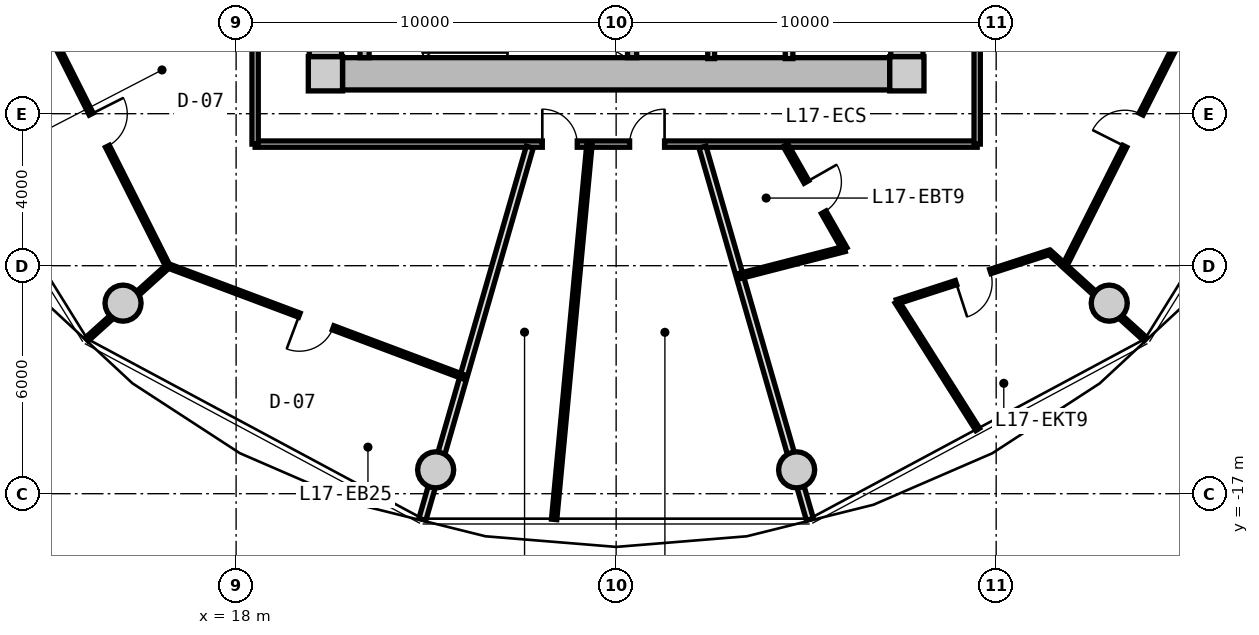
"""IFC4 building model, lengths in metres.
Left out: names, types, materials, properties, quantities, classifications, styles, units other than length and angle.
Written with IfcOpenShell. Run it as: python <this file> out.ifc"""

import sys

from ifc_helpers import new_model, si_unit, direction, frame, frame_2d, origin, origin_2d, place, context, subcontext, project, spatial, rectangle, circle, extrude, source, transform, mapped, element, fill, save


model = new_model("IFC4")
c1 = context("Model", 3, precision=1e-05, world=origin(), true_north=direction((0.0, 1.0)))
c2 = subcontext(c1, "Body", "Model", "MODEL_VIEW")
j1 = project(units=[si_unit("LENGTHUNIT", "METRE"), si_unit("PLANEANGLEUNIT", "RADIAN")], contexts=[c1])
p1 = place(None, origin())
s1 = spatial("IfcSite", under=j1, at=p1, CompositionType="ELEMENT")
p2 = place(p1, origin())
s2 = spatial("IfcBuilding", under=s1, at=p2, CompositionType="ELEMENT")
p3 = place(p2, frame((0.0, 0.0, 58.2)))
s3 = spatial("IfcBuildingStorey", under=s2, at=p3, CompositionType="ELEMENT", Elevation=58.2)
m1 = source(origin(), c2, "Body", "SweptSolid", [
    extrude(rectangle(XDim=0.9, YDim=0.9, at=origin_2d()), origin(), (0.0, 0.0, 1.0), 3.05),
])
for number, where, z_axis, x_axis in (
    (1, (20.35, -5.95, 0.0), (0.0, 0.0, 1.0), (1.0, 0.0, 0.0)),
    (2, (35.65, -5.95, 0.0), (0.0, 0.0, 1.0), (1.0, 0.0, 0.0)),
):
    element("IfcColumn", number, at=place(p3, frame(where, z_axis=z_axis, x_axis=x_axis)), inside=s3, PredefinedType="COLUMN", context=c2, shape_type="MappedRepresentation", body=[
        mapped(m1, transform((0.0, 0.0, 0.0), x_axis=(1.0, 0.0, 0.0), y_axis=(0.0, 1.0, 0.0), z_axis=(0.0, 0.0, 1.0), scale=1.0)),
    ])
m2 = source(origin(), c2, "Body", "SweptSolid", [
    extrude(rectangle(XDim=14.4, YDim=0.85, at=frame_2d((7.2, 0.0))), origin(), (0.0, 0.0, 1.0), 2.79),
])
p4 = place(p3, frame((35.2, -5.95, 0.0), z_axis=(0.0, 0.0, 1.0), x_axis=(-1.0, 0.0, 0.0)))
e3 = element("IfcWall", 3, at=p4, inside=s3, PredefinedType="SHEAR", context=c2, shape_type="MappedRepresentation", body=[
    mapped(m2, transform((0.0, 0.0, 0.0), x_axis=(1.0, 0.0, 0.0), y_axis=(0.0, 1.0, 0.0), z_axis=(0.0, 0.0, 1.0), scale=1.0)),
])
m3 = source(origin(), c2, "Body", "SweptSolid", [
    extrude(rectangle(XDim=11.0, YDim=0.85, at=frame_2d((5.5, 0.0))), origin(), (0.0, 0.0, 1.0), 2.79),
])
p5 = place(p3, frame((20.35, -5.5, 0.0), z_axis=(0.0, 0.0, 1.0), x_axis=(0.0, 1.0, 0.0)))
e4 = element("IfcWall", 4, at=p5, inside=s3, PredefinedType="SHEAR", context=c2, shape_type="MappedRepresentation", body=[
    mapped(m3, transform((0.0, 0.0, 0.0), x_axis=(1.0, 0.0, 0.0), y_axis=(0.0, 1.0, 0.0), z_axis=(0.0, 0.0, 1.0), scale=1.0)),
])
p6 = place(p5, frame((3.8, 0.0, 0.0)))
e5 = element("IfcOpeningElement", 5, at=p6, cuts=e4, PredefinedType="OPENING", context=c2, shape_type="SweptSolid", body=[
    extrude(rectangle(XDim=1.2, YDim=2.15, at=frame_2d((0.6, 1.075))), frame((0.0, 0.435, 0.0), z_axis=(0.0, -1.0, 0.0), x_axis=(1.0, 0.0, 0.0)), (0.0, 0.0, 1.0), 0.87),
])
p7 = place(p3, frame((35.65, 5.5, 0.0), z_axis=(0.0, 0.0, 1.0), x_axis=(0.0, -1.0, 0.0)))
e6 = element("IfcWall", 6, at=p7, inside=s3, PredefinedType="SHEAR", context=c2, shape_type="MappedRepresentation", body=[
    mapped(m3, transform((0.0, 0.0, 0.0), x_axis=(1.0, 0.0, 0.0), y_axis=(0.0, 1.0, 0.0), z_axis=(0.0, 0.0, 1.0), scale=1.0)),
])
p8 = place(p7, frame((5.65, 0.0, 0.0)))
e7 = element("IfcOpeningElement", 7, at=p8, cuts=e6, PredefinedType="OPENING", context=c2, shape_type="SweptSolid", body=[
    extrude(rectangle(XDim=1.2, YDim=2.15, at=frame_2d((0.6, 1.075))), frame((0.0, 0.435, 0.0), z_axis=(0.0, -1.0, 0.0), x_axis=(1.0, 0.0, 0.0)), (0.0, 0.0, 1.0), 0.87),
])
p9 = place(p7, frame((9.3, 0.0, 0.0)))
e8 = element("IfcOpeningElement", 8, at=p9, cuts=e6, PredefinedType="OPENING", context=c2, shape_type="SweptSolid", body=[
    extrude(rectangle(XDim=1.0, YDim=2.1, at=frame_2d((0.5, 1.05))), frame((0.0, 0.435, 0.0), z_axis=(0.0, -1.0, 0.0), x_axis=(1.0, 0.0, 0.0)), (0.0, 0.0, 1.0), 0.87),
])
m4 = source(origin(), c2, "Body", "SweptSolid", [
    extrude(circle(Radius=0.475, at=origin_2d()), origin(), (0.0, 0.0, 1.0), 3.05),
])
for number, where, z_axis, x_axis in (
    (9, (15.025, -11.985, 0.0), (0.0, 0.0, 1.0), (1.0, 0.0, 0.0)),
    (10, (23.251, -16.373, 0.0), (0.0, 0.0, 1.0), (1.0, 0.0, 0.0)),
    (11, (32.749, -16.373, 0.0), (0.0, 0.0, 1.0), (1.0, 0.0, 0.0)),
    (12, (40.975, -11.985, 0.0), (0.0, 0.0, 1.0), (1.0, 0.0, 0.0)),
):
    element("IfcColumn", number, at=place(p3, frame(where, z_axis=z_axis, x_axis=x_axis)), inside=s3, PredefinedType="COLUMN", context=c2, shape_type="MappedRepresentation", body=[
        mapped(m4, transform((0.0, 0.0, 0.0), x_axis=(1.0, 0.0, 0.0), y_axis=(0.0, 1.0, 0.0), z_axis=(0.0, 0.0, 1.0), scale=1.0)),
    ])
m5 = source(origin(), c2, "Body", "SweptSolid", [
    extrude(rectangle(XDim=3.075, YDim=0.24, at=frame_2d((1.538, 0.0))), origin(), (0.0, 0.0, 1.0), 2.79),
])
for number, where, z_axis, x_axis in (
    (13, (21.38, -5.525, 0.0), (0.0, 0.0, 1.0), (0.0, 1.0, 0.0)),
    (14, (28.42, -5.525, 0.0), (0.0, 0.0, 1.0), (0.0, 1.0, 0.0)),
):
    element("IfcWall", number, at=place(p3, frame(where, z_axis=z_axis, x_axis=x_axis)), inside=s3, PredefinedType="PARTITIONING", context=c2, shape_type="MappedRepresentation", body=[
        mapped(m5, transform((0.0, 0.0, 0.0), x_axis=(1.0, 0.0, 0.0), y_axis=(0.0, 1.0, 0.0), z_axis=(0.0, 0.0, 1.0), scale=1.0)),
    ])
m6 = source(origin(), c2, "Body", "SweptSolid", [
    extrude(rectangle(XDim=3.8, YDim=0.2, at=frame_2d((1.9, 0.0))), origin(), (0.0, 0.0, 1.0), 2.775),
])
p10 = place(p3, frame((32.55, -5.55, 0.0), z_axis=(0.0, 0.0, 1.0), x_axis=(0.0, 1.0, 0.0)))
e15 = element("IfcWall", 15, at=p10, inside=s3, PredefinedType="PARTITIONING", context=c2, shape_type="MappedRepresentation", body=[
    mapped(m6, transform((0.0, 0.0, 0.0), x_axis=(1.0, 0.0, 0.0), y_axis=(0.0, 1.0, 0.0), z_axis=(0.0, 0.0, 1.0), scale=1.0)),
])
m7 = source(origin(), c2, "Body", "SweptSolid", [
    extrude(rectangle(XDim=3.22, YDim=0.18, at=frame_2d((1.61, 0.0))), origin(), (0.0, 0.0, 1.0), 2.775),
])
p11 = place(p3, frame((30.5, -5.55, 0.0), z_axis=(0.0, 0.0, 1.0), x_axis=(0.0, 1.0, 0.0)))
e16 = element("IfcWall", 16, at=p11, inside=s3, PredefinedType="PARTITIONING", context=c2, shape_type="MappedRepresentation", body=[
    mapped(m7, transform((0.0, 0.0, 0.0), x_axis=(1.0, 0.0, 0.0), y_axis=(0.0, 1.0, 0.0), z_axis=(0.0, 0.0, 1.0), scale=1.0)),
])
m8 = source(origin(), c2, "Body", "SweptSolid", [
    extrude(rectangle(XDim=19.0, YDim=0.165, at=frame_2d((9.5, 0.0))), origin(), (0.0, 0.0, 1.0), 2.775),
])
p12 = place(p3, frame((37.5, -7.8, 0.0), z_axis=(0.0, 0.0, 1.0), x_axis=(-1.0, 0.0, 0.0)))
e17 = element("IfcWall", 17, at=p12, inside=s3, PredefinedType="PARTITIONING", context=c2, shape_type="MappedRepresentation", body=[
    mapped(m8, transform((0.0, 0.0, 0.0), x_axis=(1.0, 0.0, 0.0), y_axis=(0.0, 1.0, 0.0), z_axis=(0.0, 0.0, 1.0), scale=1.0)),
])
p13 = place(p12, frame((10.523, 0.0, 0.0)))
e18 = element("IfcOpeningElement", 18, at=p13, cuts=e17, PredefinedType="OPENING", context=c2, shape_type="SweptSolid", body=[
    extrude(rectangle(XDim=0.92, YDim=2.1, at=frame_2d((0.46, 1.05))), frame((0.0, 0.093, 0.0), z_axis=(0.0, -1.0, 0.0), x_axis=(1.0, 0.0, 0.0)), (0.0, 0.0, 1.0), 0.185),
])
p14 = place(p12, frame((8.226, 0.0, 0.0)))
e19 = element("IfcOpeningElement", 19, at=p14, cuts=e17, PredefinedType="OPENING", context=c2, shape_type="SweptSolid", body=[
    extrude(rectangle(XDim=0.92, YDim=2.1, at=frame_2d((0.46, 1.05))), frame((0.0, 0.093, 0.0), z_axis=(0.0, -1.0, 0.0), x_axis=(1.0, 0.0, 0.0)), (0.0, 0.0, 1.0), 0.185),
])
m9 = source(origin(), c2, "Body", "SweptSolid", [
    extrude(rectangle(XDim=15.6, YDim=0.165, at=frame_2d((7.8, 0.0))), origin(), (0.0, 0.0, 1.0), 2.775),
])
p15 = place(p3, frame((18.5, -7.8, 0.0), z_axis=(0.0, 0.0, 1.0), x_axis=(0.0, 1.0, 0.0)))
e20 = element("IfcWall", 20, at=p15, inside=s3, PredefinedType="PARTITIONING", context=c2, shape_type="MappedRepresentation", body=[
    mapped(m9, transform((0.0, 0.0, 0.0), x_axis=(1.0, 0.0, 0.0), y_axis=(0.0, 1.0, 0.0), z_axis=(0.0, 0.0, 1.0), scale=1.0)),
])
p16 = place(p15, frame((3.63, 0.0, 0.0)))
e21 = element("IfcOpeningElement", 21, at=p16, cuts=e20, PredefinedType="OPENING", context=c2, shape_type="SweptSolid", body=[
    extrude(rectangle(XDim=1.05, YDim=2.15, at=frame_2d((0.525, 1.075))), frame((0.0, 0.093, 0.0), z_axis=(0.0, -1.0, 0.0), x_axis=(1.0, 0.0, 0.0)), (0.0, 0.0, 1.0), 0.185),
])
p17 = place(p3, frame((37.5, 7.8, 0.0), z_axis=(0.0, 0.0, 1.0), x_axis=(0.0, -1.0, 0.0)))
e22 = element("IfcWall", 22, at=p17, inside=s3, PredefinedType="PARTITIONING", context=c2, shape_type="MappedRepresentation", body=[
    mapped(m9, transform((0.0, 0.0, 0.0), x_axis=(1.0, 0.0, 0.0), y_axis=(0.0, 1.0, 0.0), z_axis=(0.0, 0.0, 1.0), scale=1.0)),
])
p18 = place(p17, frame((7.275, 0.0, 0.0)))
e23 = element("IfcOpeningElement", 23, at=p18, cuts=e22, PredefinedType="OPENING", context=c2, shape_type="SweptSolid", body=[
    extrude(rectangle(XDim=1.05, YDim=2.15, at=frame_2d((0.525, 1.075))), frame((0.0, 0.093, 0.0), z_axis=(0.0, -1.0, 0.0), x_axis=(1.0, 0.0, 0.0)), (0.0, 0.0, 1.0), 0.185),
])
m10 = source(origin(), c2, "Body", "SweptSolid", [
    extrude(rectangle(XDim=10.196, YDim=0.19, at=frame_2d((5.098, 0.0))), origin(), (0.0, 0.0, 1.0), 2.225),
])
p19 = place(p3, frame((25.727, -7.88, 0.0), z_axis=(0.0, 0.0, 1.0), x_axis=(-0.277136420347, -0.960830580549, 0.0)))
e24 = element("IfcWall", 24, at=p19, inside=s3, PredefinedType="PARTITIONING", context=c2, shape_type="MappedRepresentation", body=[
    mapped(m10, transform((0.0, 0.0, 0.0), x_axis=(1.0, 0.0, 0.0), y_axis=(0.0, 1.0, 0.0), z_axis=(0.0, 0.0, 1.0), scale=1.0)),
])
m11 = source(origin(), c2, "Body", "SweptSolid", [
    extrude(rectangle(XDim=8.018, YDim=0.115, at=frame_2d((4.009, 0.0))), origin(), (0.0, 0.0, 1.0), 2.775),
])
p20 = place(p3, frame((12.596, -3.854, 0.0), z_axis=(0.0, 0.0, 1.0), x_axis=(0.450134355233, -0.89296084026, 0.0)))
e25 = element("IfcWall", 25, at=p20, inside=s3, PredefinedType="PARTITIONING", context=c2, shape_type="MappedRepresentation", body=[
    mapped(m11, transform((0.0, 0.0, 0.0), x_axis=(1.0, 0.0, 0.0), y_axis=(0.0, 1.0, 0.0), z_axis=(0.0, 0.0, 1.0), scale=1.0)),
])
p21 = place(p20, frame((3.534, 0.0, 0.0)))
e26 = element("IfcOpeningElement", 26, at=p21, cuts=e25, PredefinedType="OPENING", context=c2, shape_type="SweptSolid", body=[
    extrude(rectangle(XDim=0.95, YDim=2.1, at=frame_2d((0.475, 1.05))), frame((0.0, 0.067, 0.0), z_axis=(0.0, -1.0, 0.0), x_axis=(1.0, 0.0, 0.0)), (0.0, 0.0, 1.0), 0.135),
])
m12 = source(origin(), c2, "Body", "SweptSolid", [
    extrude(rectangle(XDim=8.32, YDim=0.115, at=frame_2d((4.16, 0.0))), origin(), (0.0, 0.0, 1.0), 2.775),
])
p22 = place(p3, frame((16.214, -11.006, 0.0), z_axis=(0.0, 0.0, 1.0), x_axis=(0.936180763098, -0.351518959382, 0.0)))
e27 = element("IfcWall", 27, at=p22, inside=s3, PredefinedType="PARTITIONING", context=c2, shape_type="MappedRepresentation", body=[
    mapped(m12, transform((0.0, 0.0, 0.0), x_axis=(1.0, 0.0, 0.0), y_axis=(0.0, 1.0, 0.0), z_axis=(0.0, 0.0, 1.0), scale=1.0)),
])
p23 = place(p22, frame((3.685, 0.0, 0.0)))
e28 = element("IfcOpeningElement", 28, at=p23, cuts=e27, PredefinedType="OPENING", context=c2, shape_type="SweptSolid", body=[
    extrude(rectangle(XDim=0.95, YDim=2.1, at=frame_2d((0.475, 1.05))), frame((0.0, 0.067, 0.0), z_axis=(0.0, -1.0, 0.0), x_axis=(1.0, 0.0, 0.0)), (0.0, 0.0, 1.0), 0.135),
])
m13 = source(origin(), c2, "Body", "SweptSolid", [
    extrude(rectangle(XDim=2.887, YDim=0.115, at=frame_2d((1.444, 0.0))), origin(), (0.0, 0.0, 1.0), 2.225),
])
p24 = place(p3, frame((16.214, -11.006, 0.0), z_axis=(0.0, 0.0, 1.0), x_axis=(-0.742448503307, -0.669903142205, 0.0)))
e29 = element("IfcWall", 29, at=p24, inside=s3, PredefinedType="PARTITIONING", context=c2, shape_type="MappedRepresentation", body=[
    mapped(m13, transform((0.0, 0.0, 0.0), x_axis=(1.0, 0.0, 0.0), y_axis=(0.0, 1.0, 0.0), z_axis=(0.0, 0.0, 1.0), scale=1.0)),
])
p25 = place(p3, frame((30.273, -7.88, 0.0), z_axis=(0.0, 0.0, 1.0), x_axis=(0.277136420347, -0.960830580549, 0.0)))
e30 = element("IfcWall", 30, at=p25, inside=s3, PredefinedType="PARTITIONING", context=c2, shape_type="MappedRepresentation", body=[
    mapped(m10, transform((0.0, 0.0, 0.0), x_axis=(1.0, 0.0, 0.0), y_axis=(0.0, 1.0, 0.0), z_axis=(0.0, 0.0, 1.0), scale=1.0)),
])
m14 = source(origin(), c2, "Body", "SweptSolid", [
    extrude(rectangle(XDim=9.89, YDim=0.14, at=frame_2d((4.945, 0.0))), origin(), (0.0, 0.0, 1.0), 2.775),
])
p26 = place(p3, frame((27.296, -7.83, 0.0), z_axis=(0.0, 0.0, 1.0), x_axis=(-0.093780403478, -0.995592906726, 0.0)))
e31 = element("IfcWall", 31, at=p26, inside=s3, PredefinedType="PARTITIONING", context=c2, shape_type="MappedRepresentation", body=[
    mapped(m14, transform((0.0, 0.0, 0.0), x_axis=(1.0, 0.0, 0.0), y_axis=(0.0, 1.0, 0.0), z_axis=(0.0, 0.0, 1.0), scale=1.0)),
])
p27 = place(p3, frame((39.795, -11.014, 0.0), z_axis=(0.0, 0.0, 1.0), x_axis=(0.450134355233, 0.89296084026, 0.0)))
e32 = element("IfcWall", 32, at=p27, inside=s3, PredefinedType="PARTITIONING", context=c2, shape_type="MappedRepresentation", body=[
    mapped(m11, transform((0.0, 0.0, 0.0), x_axis=(1.0, 0.0, 0.0), y_axis=(0.0, 1.0, 0.0), z_axis=(0.0, 0.0, 1.0), scale=1.0)),
])
p28 = place(p27, frame((3.534, 0.0, 0.0)))
e33 = element("IfcOpeningElement", 33, at=p28, cuts=e32, PredefinedType="OPENING", context=c2, shape_type="SweptSolid", body=[
    extrude(rectangle(XDim=0.95, YDim=2.1, at=frame_2d((0.475, 1.05))), frame((0.0, 0.067, 0.0), z_axis=(0.0, -1.0, 0.0), x_axis=(1.0, 0.0, 0.0)), (0.0, 0.0, 1.0), 0.135),
])
m15 = source(origin(), c2, "Body", "SweptSolid", [
    extrude(rectangle(XDim=3.4, YDim=0.115, at=frame_2d((1.7, 0.0))), origin(), (0.0, 0.0, 1.0), 2.225),
])
p29 = place(p3, frame((39.411, -10.656, 0.0), z_axis=(0.0, 0.0, 1.0), x_axis=(0.740729005272, -0.671803945172, 0.0)))
e34 = element("IfcWall", 34, at=p29, inside=s3, PredefinedType="PARTITIONING", context=c2, shape_type="MappedRepresentation", body=[
    mapped(m15, transform((0.0, 0.0, 0.0), x_axis=(1.0, 0.0, 0.0), y_axis=(0.0, 1.0, 0.0), z_axis=(0.0, 0.0, 1.0), scale=1.0)),
])
m16 = source(origin(), c2, "Body", "SweptSolid", [
    extrude(rectangle(XDim=3.141, YDim=0.14, at=frame_2d((1.571, 0.0))), origin(), (0.0, 0.0, 1.0), 2.775),
])
p30 = place(p3, frame((32.458, -7.83, 0.0), z_axis=(0.0, 0.0, 1.0), x_axis=(0.494874486088, -0.868964465913, 0.0)))
e35 = element("IfcWall", 35, at=p30, inside=s3, PredefinedType="PARTITIONING", context=c2, shape_type="MappedRepresentation", body=[
    mapped(m16, transform((0.0, 0.0, 0.0), x_axis=(1.0, 0.0, 0.0), y_axis=(0.0, 1.0, 0.0), z_axis=(0.0, 0.0, 1.0), scale=1.0)),
])
p31 = place(p30, frame((1.111, 0.0, 0.0)))
e36 = element("IfcOpeningElement", 36, at=p31, cuts=e35, PredefinedType="OPENING", context=c2, shape_type="SweptSolid", body=[
    extrude(rectangle(XDim=0.92, YDim=2.1, at=frame_2d((0.46, 1.05))), frame((0.0, 0.08, 0.0), z_axis=(0.0, -1.0, 0.0), x_axis=(1.0, 0.0, 0.0)), (0.0, 0.0, 1.0), 0.16),
])
m17 = source(origin(), c2, "Body", "SweptSolid", [
    extrude(rectangle(XDim=2.868, YDim=0.14, at=frame_2d((1.434, 0.0))), origin(), (0.0, 0.0, 1.0), 2.775),
])
p32 = place(p3, frame((34.013, -10.56, 0.0), z_axis=(0.0, 0.0, 1.0), x_axis=(-0.968467705195, -0.249139125778, 0.0)))
e37 = element("IfcWall", 37, at=p32, inside=s3, PredefinedType="PARTITIONING", context=c2, shape_type="MappedRepresentation", body=[
    mapped(m17, transform((0.0, 0.0, 0.0), x_axis=(1.0, 0.0, 0.0), y_axis=(0.0, 1.0, 0.0), z_axis=(0.0, 0.0, 1.0), scale=1.0)),
])
m18 = source(origin(), c2, "Body", "SweptSolid", [
    extrude(rectangle(XDim=3.974, YDim=0.115, at=frame_2d((1.987, 0.0))), origin(), (0.0, 0.0, 1.0), 2.775),
])
p33 = place(p3, frame((35.389, -11.95, 0.0), z_axis=(0.0, 0.0, 1.0), x_axis=(0.534810918023, -0.844971764003, 0.0)))
e38 = element("IfcWall", 38, at=p33, inside=s3, PredefinedType="PARTITIONING", context=c2, shape_type="MappedRepresentation", body=[
    mapped(m18, transform((0.0, 0.0, 0.0), x_axis=(1.0, 0.0, 0.0), y_axis=(0.0, 1.0, 0.0), z_axis=(0.0, 0.0, 1.0), scale=1.0)),
])
m19 = source(origin(), c2, "Body", "SweptSolid", [
    extrude(rectangle(XDim=4.22, YDim=0.115, at=frame_2d((2.11, 0.0))), origin(), (0.0, 0.0, 1.0), 2.775),
])
p34 = place(p3, frame((35.389, -11.95, 0.0), z_axis=(0.0, 0.0, 1.0), x_axis=(0.951130539873, 0.308789080315, 0.0)))
e39 = element("IfcWall", 39, at=p34, inside=s3, PredefinedType="PARTITIONING", context=c2, shape_type="MappedRepresentation", body=[
    mapped(m19, transform((0.0, 0.0, 0.0), x_axis=(1.0, 0.0, 0.0), y_axis=(0.0, 1.0, 0.0), z_axis=(0.0, 0.0, 1.0), scale=1.0)),
])
p35 = place(p34, frame((1.635, 0.0, 0.0)))
e40 = element("IfcOpeningElement", 40, at=p35, cuts=e39, PredefinedType="OPENING", context=c2, shape_type="SweptSolid", body=[
    extrude(rectangle(XDim=0.95, YDim=2.1, at=frame_2d((0.475, 1.05))), frame((0.0, 0.067, 0.0), z_axis=(0.0, -1.0, 0.0), x_axis=(1.0, 0.0, 0.0)), (0.0, 0.0, 1.0), 0.135),
])
m20 = source(origin(), c2, "Body", "SweptSolid", [
    extrude(rectangle(XDim=0.95, YDim=2.1, at=frame_2d((0.475, 1.05))), frame((0.0, 0.025, 0.0), z_axis=(0.0, -1.0, 0.0), x_axis=(1.0, 0.0, 0.0)), (0.0, 0.0, 1.0), 0.05),
])
p36 = place(p21, origin())
e41 = element("IfcDoor", 41, at=p36, inside=s3, OperationType="SINGLE_SWING_LEFT", PredefinedType="DOOR", context=c2, shape_type="MappedRepresentation", body=[
    mapped(m20, transform((0.0, 0.0, 0.0), x_axis=(1.0, 0.0, 0.0), y_axis=(0.0, 1.0, 0.0), z_axis=(0.0, 0.0, 1.0), scale=1.0)),
])
fill(e26, e41)
p37 = place(p23, frame((0.95, 0.0, 0.0), z_axis=(0.0, 0.0, 1.0), x_axis=(-1.0, 0.0, 0.0)))
e42 = element("IfcDoor", 42, at=p37, inside=s3, OperationType="SINGLE_SWING_RIGHT", PredefinedType="DOOR", context=c2, shape_type="MappedRepresentation", body=[
    mapped(m20, transform((0.0, 0.0, 0.0), x_axis=(1.0, 0.0, 0.0), y_axis=(0.0, 1.0, 0.0), z_axis=(0.0, 0.0, 1.0), scale=1.0)),
])
fill(e28, e42)
m21 = source(origin(), c2, "Body", "SweptSolid", [
    extrude(rectangle(XDim=0.92, YDim=2.1, at=frame_2d((0.46, 1.05))), frame((0.0, 0.025, 0.0), z_axis=(0.0, -1.0, 0.0), x_axis=(1.0, 0.0, 0.0)), (0.0, 0.0, 1.0), 0.05),
])
p38 = place(p13, frame((0.92, 0.0, 0.0), z_axis=(0.0, 0.0, 1.0), x_axis=(-1.0, 0.0, 0.0)))
e43 = element("IfcDoor", 43, at=p38, inside=s3, OperationType="SINGLE_SWING_LEFT", PredefinedType="DOOR", context=c2, shape_type="MappedRepresentation", body=[
    mapped(m21, transform((0.0, 0.0, 0.0), x_axis=(1.0, 0.0, 0.0), y_axis=(0.0, 1.0, 0.0), z_axis=(0.0, 0.0, 1.0), scale=1.0)),
])
fill(e18, e43)
p39 = place(p14, frame((0.92, 0.0, 0.0), z_axis=(0.0, 0.0, 1.0), x_axis=(-1.0, 0.0, 0.0)))
e44 = element("IfcDoor", 44, at=p39, inside=s3, OperationType="SINGLE_SWING_RIGHT", PredefinedType="DOOR", context=c2, shape_type="MappedRepresentation", body=[
    mapped(m21, transform((0.0, 0.0, 0.0), x_axis=(1.0, 0.0, 0.0), y_axis=(0.0, 1.0, 0.0), z_axis=(0.0, 0.0, 1.0), scale=1.0)),
])
fill(e19, e44)
p40 = place(p31, origin())
e45 = element("IfcDoor", 45, at=p40, inside=s3, OperationType="SINGLE_SWING_LEFT", PredefinedType="DOOR", context=c2, shape_type="MappedRepresentation", body=[
    mapped(m21, transform((0.0, 0.0, 0.0), x_axis=(1.0, 0.0, 0.0), y_axis=(0.0, 1.0, 0.0), z_axis=(0.0, 0.0, 1.0), scale=1.0)),
])
fill(e36, e45)
p41 = place(p35, frame((0.95, 0.0, 0.0), z_axis=(0.0, 0.0, 1.0), x_axis=(-1.0, 0.0, 0.0)))
e46 = element("IfcDoor", 46, at=p41, inside=s3, OperationType="SINGLE_SWING_RIGHT", PredefinedType="DOOR", context=c2, shape_type="MappedRepresentation", body=[
    mapped(m20, transform((0.0, 0.0, 0.0), x_axis=(1.0, 0.0, 0.0), y_axis=(0.0, 1.0, 0.0), z_axis=(0.0, 0.0, 1.0), scale=1.0)),
])
fill(e40, e46)
p42 = place(p28, origin())
e47 = element("IfcDoor", 47, at=p42, inside=s3, OperationType="SINGLE_SWING_LEFT", PredefinedType="DOOR", context=c2, shape_type="MappedRepresentation", body=[
    mapped(m20, transform((0.0, 0.0, 0.0), x_axis=(1.0, 0.0, 0.0), y_axis=(0.0, 1.0, 0.0), z_axis=(0.0, 0.0, 1.0), scale=1.0)),
])
fill(e33, e47)
save(model, sys.argv[1])
